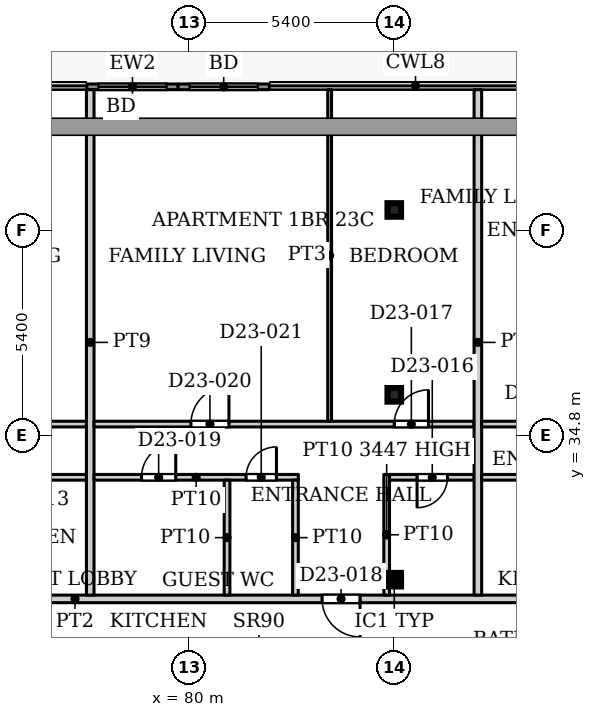
"""IFC4 building model, lengths in metres.
Left out: names, types, materials, properties, quantities, classifications, styles, units other than length and angle.
Written with IfcOpenShell. Run it as: python <this file> out.ifc"""

import sys

from ifc_helpers import new_model, si_unit, direction, frame, frame_2d, origin, origin_2d, place, context, subcontext, project, spatial, rectangle, hollow_rectangle, extrude, source, transform, mapped, element, fill, save


model = new_model("IFC4")
c1 = context("Model", 3, precision=1e-05, world=origin(), true_north=direction((0.0, 1.0)))
c2 = subcontext(c1, "Body", "Model", "MODEL_VIEW")
j1 = project(units=[si_unit("LENGTHUNIT", "METRE"), si_unit("PLANEANGLEUNIT", "RADIAN")], contexts=[c1])
p1 = place(None, origin())
s1 = spatial("IfcSite", under=j1, at=p1, CompositionType="ELEMENT")
p2 = place(p1, origin())
s2 = spatial("IfcBuilding", under=s1, at=p2, CompositionType="ELEMENT")
p3 = place(p2, frame((0.0, 0.0, 101.9)))
s3 = spatial("IfcBuildingStorey", under=s2, at=p3, CompositionType="ELEMENT", Elevation=101.9)
for number, where, z_axis, x_axis in (
    (1, (85.4, 31.005, 0.0), (0.0, 0.0, 1.0), (1.0, 0.0, 0.0)),
    (2, (85.4, 35.87, 0.0), (0.0, 0.0, 1.0), (1.0, 0.0, 0.0)),
    (3, (85.4, 40.735, 0.0), (0.0, 0.0, 1.0), (1.0, 0.0, 0.0)),
):
    element("IfcColumn", number, at=place(p3, frame(where, z_axis=z_axis, x_axis=x_axis)), inside=s3, PredefinedType="COLUMN", context=c2, shape_type="SweptSolid", body=[
        extrude(hollow_rectangle(XDim=0.356, YDim=0.356, WallThickness=0.016, InnerFilletRadius=0.016, OuterFilletRadius=0.032, at=origin_2d()), origin(), (0.0, 0.0, 1.0), 3.9),
    ])
p4 = place(p3, frame((77.312, 43.975, 0.0), z_axis=(0.0, 0.0, 1.0), x_axis=(1.0, 0.0, 0.0)))
e4 = element("IfcWall", 4, at=p4, inside=s3, PredefinedType="SOLIDWALL", context=c2, shape_type="SweptSolid", body=[
    extrude(rectangle(XDim=2.4, YDim=0.15, at=frame_2d((1.2, 0.0))), origin(), (0.0, 0.0, 1.0), 3.75),
])
p5 = place(p4, frame((0.3, 0.0, 0.0)))
e5 = element("IfcOpeningElement", 5, at=p5, cuts=e4, PredefinedType="OPENING", context=c2, shape_type="SweptSolid", body=[
    extrude(rectangle(XDim=1.8, YDim=2.4, at=frame_2d((0.9, 1.2))), frame((0.0, 0.085, 0.0), z_axis=(0.0, -1.0, 0.0), x_axis=(1.0, 0.0, 0.0)), (0.0, 0.0, 1.0), 0.17),
])
p6 = place(p3, frame((79.712, 43.975, 0.0), z_axis=(0.0, 0.0, 1.0), x_axis=(1.0, 0.0, 0.0)))
e6 = element("IfcWall", 6, at=p6, inside=s3, PredefinedType="SOLIDWALL", context=c2, shape_type="SweptSolid", body=[
    extrude(rectangle(XDim=2.4, YDim=0.15, at=frame_2d((1.2, 0.0))), origin(), (0.0, 0.0, 1.0), 3.75),
])
p7 = place(p6, frame((0.3, 0.0, 0.0)))
e7 = element("IfcOpeningElement", 7, at=p7, cuts=e6, PredefinedType="OPENING", context=c2, shape_type="SweptSolid", body=[
    extrude(rectangle(XDim=1.8, YDim=2.4, at=frame_2d((0.9, 1.2))), frame((0.0, 0.085, 0.0), z_axis=(0.0, -1.0, 0.0), x_axis=(1.0, 0.0, 0.0)), (0.0, 0.0, 1.0), 0.17),
])
p8 = place(p3, frame((55.9, 30.5, 0.0), z_axis=(0.0, 0.0, 1.0), x_axis=(1.0, 0.0, 0.0)))
e8 = element("IfcWall", 8, at=p8, inside=s3, PredefinedType="PARTITIONING", context=c2, shape_type="SweptSolid", body=[
    extrude(rectangle(XDim=42.2, YDim=0.2, at=frame_2d((21.1, 0.0))), origin(), (0.0, 0.0, 1.0), 3.6),
])
p9 = place(p8, frame((10.35, 0.0, 0.0)))
e9 = element("IfcOpeningElement", 9, at=p9, cuts=e8, PredefinedType="OPENING", context=c2, shape_type="SweptSolid", body=[
    extrude(rectangle(XDim=1.0, YDim=2.1, at=frame_2d((0.5, 1.05))), frame((0.0, 0.11, 0.0), z_axis=(0.0, -1.0, 0.0), x_axis=(1.0, 0.0, 0.0)), (0.0, 0.0, 1.0), 0.22),
])
p10 = place(p8, frame((16.65, 0.0, 0.0)))
e10 = element("IfcOpeningElement", 10, at=p10, cuts=e8, PredefinedType="OPENING", context=c2, shape_type="SweptSolid", body=[
    extrude(rectangle(XDim=1.0, YDim=2.1, at=frame_2d((0.5, 1.05))), frame((0.0, 0.11, 0.0), z_axis=(0.0, -1.0, 0.0), x_axis=(1.0, 0.0, 0.0)), (0.0, 0.0, 1.0), 0.22),
])
p11 = place(p8, frame((27.6, 0.0, 0.0)))
e11 = element("IfcOpeningElement", 11, at=p11, cuts=e8, PredefinedType="OPENING", context=c2, shape_type="SweptSolid", body=[
    extrude(rectangle(XDim=1.0, YDim=2.1, at=frame_2d((0.5, 1.05))), frame((0.0, 0.11, 0.0), z_axis=(0.0, -1.0, 0.0), x_axis=(1.0, 0.0, 0.0)), (0.0, 0.0, 1.0), 0.22),
])
p12 = place(p8, frame((36.0, 0.0, 0.0)))
e12 = element("IfcOpeningElement", 12, at=p12, cuts=e8, PredefinedType="OPENING", context=c2, shape_type="SweptSolid", body=[
    extrude(rectangle(XDim=1.0, YDim=2.1, at=frame_2d((0.5, 1.05))), frame((0.0, 0.11, 0.0), z_axis=(0.0, -1.0, 0.0), x_axis=(1.0, 0.0, 0.0)), (0.0, 0.0, 1.0), 0.22),
])
p13 = place(p3, frame((67.9, 35.1, 0.0), z_axis=(0.0, 0.0, 1.0), x_axis=(1.0, 0.0, 0.0)))
e13 = element("IfcWall", 13, at=p13, inside=s3, PredefinedType="PARTITIONING", context=c2, shape_type="SweptSolid", body=[
    extrude(rectangle(XDim=9.4, YDim=0.15, at=frame_2d((4.7, 0.0))), origin(), (0.0, 0.0, 1.0), 3.6),
])
p14 = place(p13, frame((1.4, 0.0, 0.0)))
e14 = element("IfcOpeningElement", 14, at=p14, cuts=e13, PredefinedType="OPENING", context=c2, shape_type="SweptSolid", body=[
    extrude(rectangle(XDim=0.9, YDim=2.1, at=frame_2d((0.45, 1.05))), frame((0.0, 0.085, 0.0), z_axis=(0.0, -1.0, 0.0), x_axis=(1.0, 0.0, 0.0)), (0.0, 0.0, 1.0), 0.17),
])
p15 = place(p13, frame((6.15, 0.0, 0.0)))
e15 = element("IfcOpeningElement", 15, at=p15, cuts=e13, PredefinedType="OPENING", context=c2, shape_type="SweptSolid", body=[
    extrude(rectangle(XDim=1.0, YDim=2.1, at=frame_2d((0.5, 1.05))), frame((0.0, 0.085, 0.0), z_axis=(0.0, -1.0, 0.0), x_axis=(1.0, 0.0, 0.0)), (0.0, 0.0, 1.0), 0.17),
])
p16 = place(p3, frame((74.05, 33.7, 0.0), z_axis=(0.0, 0.0, 1.0), x_axis=(1.0, 0.0, 0.0)))
e16 = element("IfcWall", 16, at=p16, inside=s3, PredefinedType="PARTITIONING", context=c2, shape_type="SweptSolid", body=[
    extrude(rectangle(XDim=3.25, YDim=0.15, at=frame_2d((1.625, 0.0))), origin(), (0.0, 0.0, 1.0), 3.6),
])
p17 = place(p16, frame((1.25, 0.0, 0.0)))
e17 = element("IfcOpeningElement", 17, at=p17, cuts=e16, PredefinedType="OPENING", context=c2, shape_type="SweptSolid", body=[
    extrude(rectangle(XDim=0.9, YDim=2.1, at=frame_2d((0.45, 1.05))), frame((0.0, 0.085, 0.0), z_axis=(0.0, -1.0, 0.0), x_axis=(1.0, 0.0, 0.0)), (0.0, 0.0, 1.0), 0.17),
])
p18 = place(p3, frame((77.4, 30.6, 0.0), z_axis=(0.0, 0.0, 1.0), x_axis=(0.0, 1.0, 0.0)))
e18 = element("IfcWall", 18, at=p18, inside=s3, PredefinedType="PARTITIONING", context=c2, shape_type="SweptSolid", body=[
    extrude(rectangle(XDim=13.3, YDim=0.2, at=frame_2d((6.65, 0.0))), origin(), (0.0, 0.0, 1.0), 3.6),
])
p19 = place(p3, frame((77.5, 33.7, 0.0), z_axis=(0.0, 0.0, 1.0), x_axis=(1.0, 0.0, 0.0)))
e19 = element("IfcWall", 19, at=p19, inside=s3, PredefinedType="PARTITIONING", context=c2, shape_type="SweptSolid", body=[
    extrude(rectangle(XDim=5.375, YDim=0.15, at=frame_2d((2.688, 0.0))), origin(), (0.0, 0.0, 1.0), 3.6),
])
p20 = place(p19, frame((1.25, 0.0, 0.0)))
e20 = element("IfcOpeningElement", 20, at=p20, cuts=e19, PredefinedType="OPENING", context=c2, shape_type="SweptSolid", body=[
    extrude(rectangle(XDim=0.9, YDim=2.1, at=frame_2d((0.45, 1.05))), frame((0.0, 0.085, 0.0), z_axis=(0.0, -1.0, 0.0), x_axis=(1.0, 0.0, 0.0)), (0.0, 0.0, 1.0), 0.17),
])
p21 = place(p19, frame((4.0, 0.0, 0.0)))
e21 = element("IfcOpeningElement", 21, at=p21, cuts=e19, PredefinedType="OPENING", context=c2, shape_type="SweptSolid", body=[
    extrude(rectangle(XDim=0.8, YDim=2.1, at=frame_2d((0.4, 1.05))), frame((0.0, 0.085, 0.0), z_axis=(0.0, -1.0, 0.0), x_axis=(1.0, 0.0, 0.0)), (0.0, 0.0, 1.0), 0.17),
])
p22 = place(p3, frame((77.5, 35.1, 0.0), z_axis=(0.0, 0.0, 1.0), x_axis=(1.0, 0.0, 0.0)))
e22 = element("IfcWall", 22, at=p22, inside=s3, PredefinedType="PARTITIONING", context=c2, shape_type="SweptSolid", body=[
    extrude(rectangle(XDim=10.0, YDim=0.15, at=frame_2d((5.0, 0.0))), origin(), (0.0, 0.0, 1.0), 3.6),
])
p23 = place(p22, frame((7.9, 0.0, 0.0)))
e23 = element("IfcOpeningElement", 23, at=p23, cuts=e22, PredefinedType="OPENING", context=c2, shape_type="SweptSolid", body=[
    extrude(rectangle(XDim=0.9, YDim=2.1, at=frame_2d((0.45, 1.05))), frame((0.0, 0.085, 0.0), z_axis=(0.0, -1.0, 0.0), x_axis=(1.0, 0.0, 0.0)), (0.0, 0.0, 1.0), 0.17),
])
p24 = place(p22, frame((2.55, 0.0, 0.0)))
e24 = element("IfcOpeningElement", 24, at=p24, cuts=e22, PredefinedType="OPENING", context=c2, shape_type="SweptSolid", body=[
    extrude(rectangle(XDim=1.0, YDim=2.1, at=frame_2d((0.5, 1.05))), frame((0.0, 0.085, 0.0), z_axis=(0.0, -1.0, 0.0), x_axis=(1.0, 0.0, 0.0)), (0.0, 0.0, 1.0), 0.17),
])
for number, where, z_axis, x_axis in (
    (25, (81.0, 30.6, 0.0), (0.0, 0.0, 1.0), (0.0, 1.0, 0.0)),
    (26, (82.8, 30.6, 0.0), (0.0, 0.0, 1.0), (0.0, 1.0, 0.0)),
):
    element("IfcWall", number, at=place(p3, frame(where, z_axis=z_axis, x_axis=x_axis)), inside=s3, PredefinedType="PARTITIONING", context=c2, shape_type="SweptSolid", body=[
        extrude(rectangle(XDim=3.025, YDim=0.15, at=frame_2d((1.512, 0.0))), origin(), (0.0, 0.0, 1.0), 3.6),
    ])
p25 = place(p3, frame((83.7, 35.175, 0.0), z_axis=(0.0, 0.0, 1.0), x_axis=(0.0, 1.0, 0.0)))
e27 = element("IfcWall", 27, at=p25, inside=s3, PredefinedType="PARTITIONING", context=c2, shape_type="SweptSolid", body=[
    extrude(rectangle(XDim=8.725, YDim=0.1, at=frame_2d((4.362, 0.0))), origin(), (0.0, 0.0, 1.0), 3.6),
])
p26 = place(p3, frame((85.2, 30.6, 0.0), z_axis=(0.0, 0.0, 1.0), x_axis=(0.0, 1.0, 0.0)))
e28 = element("IfcWall", 28, at=p26, inside=s3, PredefinedType="PARTITIONING", context=c2, shape_type="SweptSolid", body=[
    extrude(rectangle(XDim=3.175, YDim=0.15, at=frame_2d((1.587, 0.0))), origin(), (0.0, 0.0, 1.0), 3.447),
])
p27 = place(p3, frame((85.275, 33.7, 0.0), z_axis=(0.0, 0.0, 1.0), x_axis=(1.0, 0.0, 0.0)))
e29 = element("IfcWall", 29, at=p27, inside=s3, PredefinedType="PARTITIONING", context=c2, shape_type="SweptSolid", body=[
    extrude(rectangle(XDim=2.225, YDim=0.15, at=frame_2d((1.113, 0.0))), origin(), (0.0, 0.0, 1.0), 3.6),
])
p28 = place(p27, frame((0.725, 0.0, 0.0)))
e30 = element("IfcOpeningElement", 30, at=p28, cuts=e29, PredefinedType="OPENING", context=c2, shape_type="SweptSolid", body=[
    extrude(rectangle(XDim=0.8, YDim=2.1, at=frame_2d((0.4, 1.05))), frame((0.0, 0.085, 0.0), z_axis=(0.0, -1.0, 0.0), x_axis=(1.0, 0.0, 0.0)), (0.0, 0.0, 1.0), 0.17),
])
p29 = place(p3, frame((87.6, 30.6, 0.0), z_axis=(0.0, 0.0, 1.0), x_axis=(0.0, 1.0, 0.0)))
e31 = element("IfcWall", 31, at=p29, inside=s3, PredefinedType="PARTITIONING", context=c2, shape_type="SweptSolid", body=[
    extrude(rectangle(XDim=13.3, YDim=0.2, at=frame_2d((6.65, 0.0))), origin(), (0.0, 0.0, 1.0), 3.6),
])
p30 = place(p3, frame((87.7, 33.7, 0.0), z_axis=(0.0, 0.0, 1.0), x_axis=(1.0, 0.0, 0.0)))
e32 = element("IfcWall", 32, at=p30, inside=s3, PredefinedType="PARTITIONING", context=c2, shape_type="SweptSolid", body=[
    extrude(rectangle(XDim=3.55, YDim=0.15, at=frame_2d((1.775, 0.0))), origin(), (0.0, 0.0, 1.0), 3.6),
])
p31 = place(p30, frame((1.25, 0.0, 0.0)))
e33 = element("IfcOpeningElement", 33, at=p31, cuts=e32, PredefinedType="OPENING", context=c2, shape_type="SweptSolid", body=[
    extrude(rectangle(XDim=0.9, YDim=2.1, at=frame_2d((0.45, 1.05))), frame((0.0, 0.085, 0.0), z_axis=(0.0, -1.0, 0.0), x_axis=(1.0, 0.0, 0.0)), (0.0, 0.0, 1.0), 0.17),
])
p32 = place(p3, frame((87.7, 35.1, 0.0), z_axis=(0.0, 0.0, 1.0), x_axis=(1.0, 0.0, 0.0)))
e34 = element("IfcWall", 34, at=p32, inside=s3, PredefinedType="PARTITIONING", context=c2, shape_type="SweptSolid", body=[
    extrude(rectangle(XDim=12.2, YDim=0.15, at=frame_2d((6.1, 0.0))), origin(), (0.0, 0.0, 1.0), 3.6),
])
p33 = place(p32, frame((9.8, 0.0, 0.0)))
e35 = element("IfcOpeningElement", 35, at=p33, cuts=e34, PredefinedType="OPENING", context=c2, shape_type="SweptSolid", body=[
    extrude(rectangle(XDim=0.9, YDim=2.1, at=frame_2d((0.45, 1.05))), frame((0.0, 0.085, 0.0), z_axis=(0.0, -1.0, 0.0), x_axis=(1.0, 0.0, 0.0)), (0.0, 0.0, 1.0), 0.17),
])
p34 = place(p32, frame((1.5, 0.0, 0.0)))
e36 = element("IfcOpeningElement", 36, at=p34, cuts=e34, PredefinedType="OPENING", context=c2, shape_type="SweptSolid", body=[
    extrude(rectangle(XDim=1.0, YDim=2.1, at=frame_2d((0.5, 1.05))), frame((0.0, 0.085, 0.0), z_axis=(0.0, -1.0, 0.0), x_axis=(1.0, 0.0, 0.0)), (0.0, 0.0, 1.0), 0.17),
])
p35 = place(p32, frame((6.8, 0.0, 0.0)))
e37 = element("IfcOpeningElement", 37, at=p35, cuts=e34, PredefinedType="OPENING", context=c2, shape_type="SweptSolid", body=[
    extrude(rectangle(XDim=0.9, YDim=2.1, at=frame_2d((0.45, 1.05))), frame((0.0, 0.085, 0.0), z_axis=(0.0, -1.0, 0.0), x_axis=(1.0, 0.0, 0.0)), (0.0, 0.0, 1.0), 0.17),
])
m1 = source(origin(), c2, "Body", "SweptSolid", [
    extrude(rectangle(XDim=1.8, YDim=2.4, at=frame_2d((0.9, 1.2))), frame((0.0, 0.025, 0.0), z_axis=(0.0, -1.0, 0.0), x_axis=(1.0, 0.0, 0.0)), (0.0, 0.0, 1.0), 0.05),
])
p36 = place(p5, origin())
e38 = element("IfcDoor", 38, at=p36, inside=s3, OperationType="SLIDING_TO_LEFT", PredefinedType="DOOR", context=c2, shape_type="MappedRepresentation", body=[
    mapped(m1, transform((0.0, 0.0, 0.0), x_axis=(1.0, 0.0, 0.0), y_axis=(0.0, 1.0, 0.0), z_axis=(0.0, 0.0, 1.0), scale=1.0)),
])
fill(e5, e38)
p37 = place(p7, origin())
e39 = element("IfcDoor", 39, at=p37, inside=s3, OperationType="SLIDING_TO_LEFT", PredefinedType="DOOR", context=c2, shape_type="MappedRepresentation", body=[
    mapped(m1, transform((0.0, 0.0, 0.0), x_axis=(1.0, 0.0, 0.0), y_axis=(0.0, 1.0, 0.0), z_axis=(0.0, 0.0, 1.0), scale=1.0)),
])
fill(e7, e39)
m2 = source(origin(), c2, "Body", "SweptSolid", [
    extrude(rectangle(XDim=0.8, YDim=2.1, at=frame_2d((0.4, 1.05))), frame((0.0, 0.025, 0.0), z_axis=(0.0, -1.0, 0.0), x_axis=(1.0, 0.0, 0.0)), (0.0, 0.0, 1.0), 0.05),
])
p38 = place(p28, origin())
e40 = element("IfcDoor", 40, at=p38, inside=s3, OperationType="SINGLE_SWING_RIGHT", PredefinedType="DOOR", context=c2, shape_type="MappedRepresentation", body=[
    mapped(m2, transform((0.0, 0.0, 0.0), x_axis=(1.0, 0.0, 0.0), y_axis=(0.0, 1.0, 0.0), z_axis=(0.0, 0.0, 1.0), scale=1.0)),
])
fill(e30, e40)
m3 = source(origin(), c2, "Body", "SweptSolid", [
    extrude(rectangle(XDim=0.9, YDim=2.1, at=frame_2d((0.45, 1.05))), frame((0.0, 0.025, 0.0), z_axis=(0.0, -1.0, 0.0), x_axis=(1.0, 0.0, 0.0)), (0.0, 0.0, 1.0), 0.05),
])
p39 = place(p23, origin())
e41 = element("IfcDoor", 41, at=p39, inside=s3, OperationType="SINGLE_SWING_LEFT", PredefinedType="DOOR", context=c2, shape_type="MappedRepresentation", body=[
    mapped(m3, transform((0.0, 0.0, 0.0), x_axis=(1.0, 0.0, 0.0), y_axis=(0.0, 1.0, 0.0), z_axis=(0.0, 0.0, 1.0), scale=1.0)),
])
fill(e23, e41)
m4 = source(origin(), c2, "Body", "SweptSolid", [
    extrude(rectangle(XDim=1.0, YDim=2.1, at=frame_2d((0.5, 1.05))), frame((0.0, 0.025, 0.0), z_axis=(0.0, -1.0, 0.0), x_axis=(1.0, 0.0, 0.0)), (0.0, 0.0, 1.0), 0.05),
])
p40 = place(p11, origin())
e42 = element("IfcDoor", 42, at=p40, inside=s3, OperationType="SINGLE_SWING_RIGHT", PredefinedType="DOOR", context=c2, shape_type="MappedRepresentation", body=[
    mapped(m4, transform((0.0, 0.0, 0.0), x_axis=(1.0, 0.0, 0.0), y_axis=(0.0, 1.0, 0.0), z_axis=(0.0, 0.0, 1.0), scale=1.0)),
])
fill(e11, e42)
p41 = place(p20, origin())
e43 = element("IfcDoor", 43, at=p41, inside=s3, OperationType="SINGLE_SWING_LEFT", PredefinedType="DOOR", context=c2, shape_type="MappedRepresentation", body=[
    mapped(m3, transform((0.0, 0.0, 0.0), x_axis=(1.0, 0.0, 0.0), y_axis=(0.0, 1.0, 0.0), z_axis=(0.0, 0.0, 1.0), scale=1.0)),
])
fill(e20, e43)
m5 = source(origin(), c2, "Body", "SweptSolid", [
    extrude(rectangle(XDim=1.0, YDim=2.1, at=frame_2d((0.5, 1.05))), frame((0.0, 0.025, 0.0), z_axis=(0.0, -1.0, 0.0), x_axis=(1.0, 0.0, 0.0)), (0.0, 0.0, 1.0), 0.05),
])
p42 = place(p24, origin())
e44 = element("IfcDoor", 44, at=p42, inside=s3, OperationType="SINGLE_SWING_LEFT", PredefinedType="DOOR", context=c2, shape_type="MappedRepresentation", body=[
    mapped(m5, transform((0.0, 0.0, 0.0), x_axis=(1.0, 0.0, 0.0), y_axis=(0.0, 1.0, 0.0), z_axis=(0.0, 0.0, 1.0), scale=1.0)),
])
fill(e24, e44)
p43 = place(p21, origin())
e45 = element("IfcDoor", 45, at=p43, inside=s3, OperationType="SINGLE_SWING_LEFT", PredefinedType="DOOR", context=c2, shape_type="MappedRepresentation", body=[
    mapped(m2, transform((0.0, 0.0, 0.0), x_axis=(1.0, 0.0, 0.0), y_axis=(0.0, 1.0, 0.0), z_axis=(0.0, 0.0, 1.0), scale=1.0)),
])
fill(e21, e45)
save(model, sys.argv[1])
